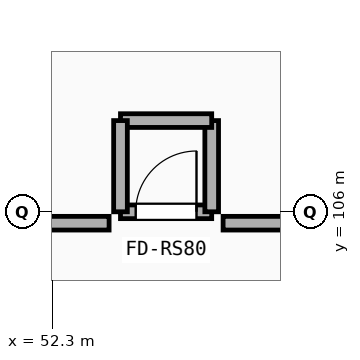
"""IFC4 building model, lengths in metres.
Left out: names, types, materials, properties, quantities, classifications, styles, units other than length and angle.
Written with IfcOpenShell. Run it as: python <this file> out.ifc"""

import sys

from ifc_helpers import new_model, si_unit, direction, frame, frame_2d, origin, place, context, subcontext, project, spatial, rectangle, extrude, element, fill, save


model = new_model("IFC4")
c1 = context("Model", 3, precision=1e-05, world=origin(), true_north=direction((0.0, 1.0)))
c2 = subcontext(c1, "Body", "Model", "MODEL_VIEW")
j1 = project(units=[si_unit("LENGTHUNIT", "METRE"), si_unit("PLANEANGLEUNIT", "RADIAN")], contexts=[c1])
p1 = place(None, origin())
s1 = spatial("IfcSite", under=j1, at=p1, CompositionType="ELEMENT")
p2 = place(p1, origin())
s2 = spatial("IfcBuilding", under=s1, at=p2, CompositionType="ELEMENT")
p3 = place(p2, frame((0.0, 0.0, 5.4)))
s3 = spatial("IfcBuildingStorey", under=s2, at=p3, CompositionType="ELEMENT", Elevation=5.4)
p4 = place(p3, frame((35.35, 105.85, 0.0), z_axis=(0.0, 0.0, 1.0), x_axis=(1.0, 0.0, 0.0)))
e1 = element("IfcWall", 1, at=p4, inside=s3, PredefinedType="PARTITIONING", context=c2, shape_type="SweptSolid", body=[
    extrude(rectangle(XDim=17.7, YDim=0.18, at=frame_2d((8.85, 0.0))), origin(), (0.0, 0.0, 1.0), 3.25),
])
p5 = place(p3, frame((54.55, 105.85, 0.0), z_axis=(0.0, 0.0, 1.0), x_axis=(1.0, 0.0, 0.0)))
e2 = element("IfcWall", 2, at=p5, inside=s3, PredefinedType="PARTITIONING", context=c2, shape_type="SweptSolid", body=[
    extrude(rectangle(XDim=5.75, YDim=0.18, at=frame_2d((2.875, 0.0))), origin(), (0.0, 0.0, 1.0), 3.25),
])
p6 = place(p3, frame((53.2, 106.0, 0.0), z_axis=(0.0, 0.0, 1.0), x_axis=(1.0, 0.0, 0.0)))
e3 = element("IfcWall", 3, at=p6, inside=s3, PredefinedType="SOLIDWALL", context=c2, shape_type="SweptSolid", body=[
    extrude(rectangle(XDim=1.2, YDim=0.18, at=frame_2d((0.6, 0.0))), origin(), (0.0, 0.0, 1.0), 3.97),
])
p7 = place(p6, frame((0.2, 0.0, -0.01)))
e4 = element("IfcOpeningElement", 4, at=p7, cuts=e3, PredefinedType="OPENING", context=c2, shape_type="SweptSolid", body=[
    extrude(rectangle(XDim=0.8, YDim=2.06, at=frame_2d((0.4, 1.03))), frame((0.0, 0.1, 0.0), z_axis=(0.0, -1.0, 0.0), x_axis=(1.0, 0.0, 0.0)), (0.0, 0.0, 1.0), 0.2),
])
for number, where, z_axis, x_axis in (
    (5, (54.4, 106.0, 0.0), (0.0, 0.0, 1.0), (0.0, 1.0, 0.0)),
    (6, (54.4, 107.2, 0.0), (0.0, 0.0, 1.0), (-1.0, 0.0, 0.0)),
    (7, (53.2, 107.2, 0.0), (0.0, 0.0, 1.0), (0.0, -1.0, 0.0)),
):
    element("IfcWall", number, at=place(p3, frame(where, z_axis=z_axis, x_axis=x_axis)), inside=s3, PredefinedType="SOLIDWALL", context=c2, shape_type="SweptSolid", body=[
        extrude(rectangle(XDim=1.2, YDim=0.18, at=frame_2d((0.6, 0.0))), origin(), (0.0, 0.0, 1.0), 3.97),
    ])
p8 = place(p7, frame((0.0, 0.0, 0.01)))
e8 = element("IfcDoor", 8, at=p8, inside=s3, OperationType="SINGLE_SWING_RIGHT", PredefinedType="DOOR", context=c2, shape_type="SweptSolid", body=[
    extrude(rectangle(XDim=0.8, YDim=2.05, at=frame_2d((0.4, 1.025))), frame((0.0, 0.025, 0.0), z_axis=(0.0, -1.0, 0.0), x_axis=(1.0, 0.0, 0.0)), (0.0, 0.0, 1.0), 0.05),
])
fill(e4, e8)
save(model, sys.argv[1])
